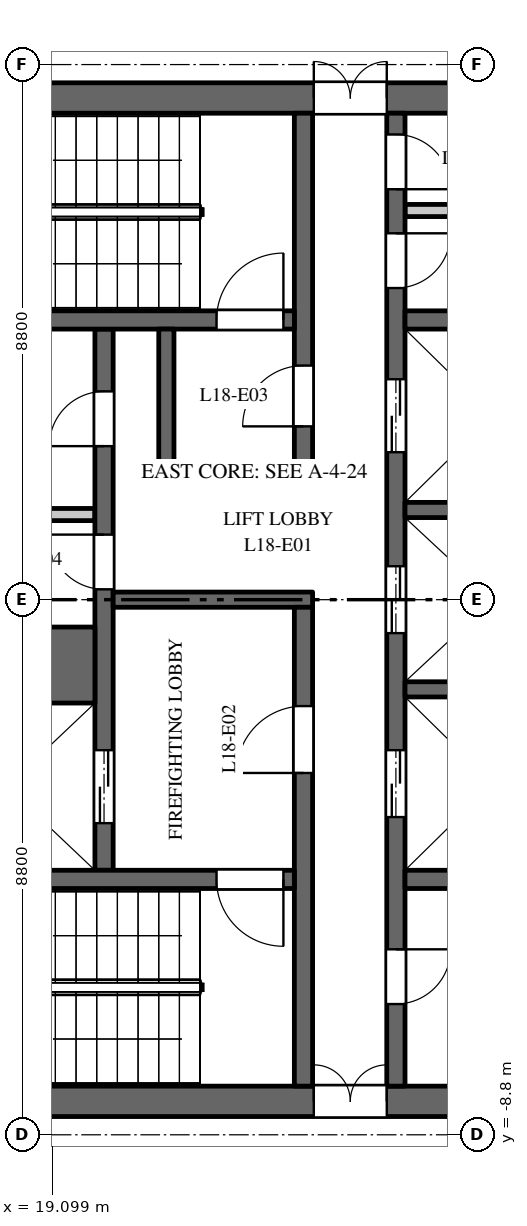
"""IFC4 building model, lengths in metres.
Left out: names, types, materials, properties, quantities, classifications, styles, units other than length and angle.
Written with IfcOpenShell. Run it as: python <this file> out.ifc"""

import sys

from ifc_helpers import new_model, si_unit, direction, frame, frame_2d, origin, place, context, subcontext, project, spatial, rectangle, extrude, element, fill, save


model = new_model("IFC4")
c1 = context("Model", 3, precision=1e-05, world=origin(), true_north=direction((0.0, 1.0)))
c2 = subcontext(c1, "Body", "Model", "MODEL_VIEW")
j1 = project(units=[si_unit("LENGTHUNIT", "METRE"), si_unit("PLANEANGLEUNIT", "RADIAN")], contexts=[c1])
p1 = place(None, origin())
s1 = spatial("IfcSite", under=j1, at=p1, CompositionType="ELEMENT")
p2 = place(p1, origin())
s2 = spatial("IfcBuilding", under=s1, at=p2, CompositionType="ELEMENT")
p3 = place(p2, frame((0.0, 0.0, 82.5)))
s3 = spatial("IfcBuildingStorey", under=s2, at=p3, CompositionType="ELEMENT", Elevation=82.5)
p4 = place(p3, frame((16.5, 8.25, 0.0), z_axis=(0.0, 0.0, 1.0), x_axis=(1.0, 0.0, 0.0)))
e1 = element("IfcWall", 1, at=p4, inside=s3, PredefinedType="SHEAR", context=c2, shape_type="SweptSolid", body=[
    extrude(rectangle(XDim=15.0, YDim=0.5, at=frame_2d((7.5, 0.0))), origin(), (0.0, 0.0, 1.0), 5.2),
])
p5 = place(p4, frame((6.9, 0.0, 0.0)))
e2 = element("IfcOpeningElement", 2, at=p5, cuts=e1, PredefinedType="OPENING", context=c2, shape_type="SweptSolid", body=[
    extrude(rectangle(XDim=1.2, YDim=2.1, at=frame_2d((0.6, 1.05))), frame((0.0, 0.26, 0.0), z_axis=(0.0, -1.0, 0.0), x_axis=(1.0, 0.0, 0.0)), (0.0, 0.0, 1.0), 0.52),
])
p6 = place(p4, frame((12.275, 0.0, 0.0)))
e3 = element("IfcOpeningElement", 3, at=p6, cuts=e1, PredefinedType="OPENING", context=c2, shape_type="SweptSolid", body=[
    extrude(rectangle(XDim=0.9, YDim=2.1, at=frame_2d((0.45, 1.05))), frame((0.0, 0.26, 0.0), z_axis=(0.0, -1.0, 0.0), x_axis=(1.0, 0.0, 0.0)), (0.0, 0.0, 1.0), 0.52),
])
p7 = place(p3, frame((16.5, -8.25, 0.0), z_axis=(0.0, 0.0, 1.0), x_axis=(1.0, 0.0, 0.0)))
e4 = element("IfcWall", 4, at=p7, inside=s3, PredefinedType="SHEAR", context=c2, shape_type="SweptSolid", body=[
    extrude(rectangle(XDim=15.0, YDim=0.5, at=frame_2d((7.5, 0.0))), origin(), (0.0, 0.0, 1.0), 5.2),
])
p8 = place(p7, frame((6.9, 0.0, 0.0)))
e5 = element("IfcOpeningElement", 5, at=p8, cuts=e4, PredefinedType="OPENING", context=c2, shape_type="SweptSolid", body=[
    extrude(rectangle(XDim=1.2, YDim=2.1, at=frame_2d((0.6, 1.05))), frame((0.0, 0.26, 0.0), z_axis=(0.0, -1.0, 0.0), x_axis=(1.0, 0.0, 0.0)), (0.0, 0.0, 1.0), 0.52),
])
p9 = place(p7, frame((12.95, 0.0, 0.0)))
e6 = element("IfcOpeningElement", 6, at=p9, cuts=e4, PredefinedType="OPENING", context=c2, shape_type="SweptSolid", body=[
    extrude(rectangle(XDim=0.9, YDim=2.1, at=frame_2d((0.45, 1.05))), frame((0.0, 0.26, 0.0), z_axis=(0.0, -1.0, 0.0), x_axis=(1.0, 0.0, 0.0)), (0.0, 0.0, 1.0), 0.52),
])
p10 = place(p3, frame((16.9, 1.4, 0.0), z_axis=(0.0, 0.0, 1.0), x_axis=(1.0, 0.0, 0.0)))
e7 = element("IfcWall", 7, at=p10, inside=s3, PredefinedType="PARTITIONING", context=c2, shape_type="SweptSolid", body=[
    extrude(rectangle(XDim=2.9, YDim=0.2, at=frame_2d((1.45, 0.0))), origin(), (0.0, 0.0, 1.0), 5.2),
])
p11 = place(p3, frame((19.95, -4.45, 0.0), z_axis=(0.0, 0.0, 1.0), x_axis=(0.0, 1.0, 0.0)))
e8 = element("IfcWall", 8, at=p11, inside=s3, PredefinedType="SHEAR", context=c2, shape_type="SweptSolid", body=[
    extrude(rectangle(XDim=8.9, YDim=0.3, at=frame_2d((4.45, 0.0))), origin(), (0.0, 0.0, 1.0), 5.2),
])
p12 = place(p11, frame((0.775, 0.0, 0.0)))
e9 = element("IfcOpeningElement", 9, at=p12, cuts=e8, PredefinedType="OPENING", context=c2, shape_type="SweptSolid", body=[
    extrude(rectangle(XDim=1.2, YDim=2.1, at=frame_2d((0.6, 1.05))), frame((0.0, 0.16, 0.0), z_axis=(0.0, -1.0, 0.0), x_axis=(1.0, 0.0, 0.0)), (0.0, 0.0, 1.0), 0.32),
])
p13 = place(p11, frame((4.62, 0.0, 0.0)))
e10 = element("IfcOpeningElement", 10, at=p13, cuts=e8, PredefinedType="OPENING", context=c2, shape_type="SweptSolid", body=[
    extrude(rectangle(XDim=0.9, YDim=2.1, at=frame_2d((0.45, 1.05))), frame((0.0, 0.16, 0.0), z_axis=(0.0, -1.0, 0.0), x_axis=(1.0, 0.0, 0.0)), (0.0, 0.0, 1.0), 0.32),
])
p14 = place(p11, frame((6.975, 0.0, 0.0)))
e11 = element("IfcOpeningElement", 11, at=p14, cuts=e8, PredefinedType="OPENING", context=c2, shape_type="SweptSolid", body=[
    extrude(rectangle(XDim=0.9, YDim=2.1, at=frame_2d((0.45, 1.05))), frame((0.0, 0.16, 0.0), z_axis=(0.0, -1.0, 0.0), x_axis=(1.0, 0.0, 0.0)), (0.0, 0.0, 1.0), 0.32),
])
p15 = place(p3, frame((24.75, -8.0, 0.0), z_axis=(0.0, 0.0, 1.0), x_axis=(0.0, 1.0, 0.0)))
e12 = element("IfcWall", 12, at=p15, inside=s3, PredefinedType="SHEAR", context=c2, shape_type="SweptSolid", body=[
    extrude(rectangle(XDim=16.0, YDim=0.3, at=frame_2d((8.0, 0.0))), origin(), (0.0, 0.0, 1.0), 5.2),
])
p16 = place(p15, frame((4.425, 0.0, 0.0)))
e13 = element("IfcOpeningElement", 13, at=p16, cuts=e12, PredefinedType="OPENING", context=c2, shape_type="SweptSolid", body=[
    extrude(rectangle(XDim=1.1, YDim=2.1, at=frame_2d((0.55, 1.05))), frame((0.0, 0.16, 0.0), z_axis=(0.0, -1.0, 0.0), x_axis=(1.0, 0.0, 0.0)), (0.0, 0.0, 1.0), 0.32),
])
p17 = place(p15, frame((7.45, 0.0, 0.0)))
e14 = element("IfcOpeningElement", 14, at=p17, cuts=e12, PredefinedType="OPENING", context=c2, shape_type="SweptSolid", body=[
    extrude(rectangle(XDim=1.1, YDim=2.1, at=frame_2d((0.55, 1.05))), frame((0.0, 0.16, 0.0), z_axis=(0.0, -1.0, 0.0), x_axis=(1.0, 0.0, 0.0)), (0.0, 0.0, 1.0), 0.32),
])
p18 = place(p15, frame((10.425, 0.0, 0.0)))
e15 = element("IfcOpeningElement", 15, at=p18, cuts=e12, PredefinedType="OPENING", context=c2, shape_type="SweptSolid", body=[
    extrude(rectangle(XDim=1.2, YDim=2.1, at=frame_2d((0.6, 1.05))), frame((0.0, 0.16, 0.0), z_axis=(0.0, -1.0, 0.0), x_axis=(1.0, 0.0, 0.0)), (0.0, 0.0, 1.0), 0.32),
])
p19 = place(p15, frame((13.125, 0.0, 0.0)))
e16 = element("IfcOpeningElement", 16, at=p19, cuts=e12, PredefinedType="OPENING", context=c2, shape_type="SweptSolid", body=[
    extrude(rectangle(XDim=0.9, YDim=2.1, at=frame_2d((0.45, 1.05))), frame((0.0, 0.16, 0.0), z_axis=(0.0, -1.0, 0.0), x_axis=(1.0, 0.0, 0.0)), (0.0, 0.0, 1.0), 0.32),
])
p20 = place(p15, frame((14.75, 0.0, 0.0)))
e17 = element("IfcOpeningElement", 17, at=p20, cuts=e12, PredefinedType="OPENING", context=c2, shape_type="SweptSolid", body=[
    extrude(rectangle(XDim=0.9, YDim=2.1, at=frame_2d((0.45, 1.05))), frame((0.0, 0.16, 0.0), z_axis=(0.0, -1.0, 0.0), x_axis=(1.0, 0.0, 0.0)), (0.0, 0.0, 1.0), 0.32),
])
p21 = place(p15, frame((1.35, 0.0, 0.0)))
e18 = element("IfcOpeningElement", 18, at=p21, cuts=e12, PredefinedType="OPENING", context=c2, shape_type="SweptSolid", body=[
    extrude(rectangle(XDim=0.9, YDim=2.1, at=frame_2d((0.45, 1.05))), frame((0.0, 0.16, 0.0), z_axis=(0.0, -1.0, 0.0), x_axis=(1.0, 0.0, 0.0)), (0.0, 0.0, 1.0), 0.32),
])
p22 = place(p3, frame((20.1, 0.0, 0.0), z_axis=(0.0, 0.0, 1.0), x_axis=(1.0, 0.0, 0.0)))
e19 = element("IfcWall", 19, at=p22, inside=s3, PredefinedType="SHEAR", context=c2, shape_type="SweptSolid", body=[
    extrude(rectangle(XDim=3.28, YDim=0.25, at=frame_2d((1.64, 0.0))), origin(), (0.0, 0.0, 1.0), 5.2),
])
p23 = place(p3, frame((24.9, 4.6, 0.0), z_axis=(0.0, 0.0, 1.0), x_axis=(1.0, 0.0, 0.0)))
e20 = element("IfcWall", 20, at=p23, inside=s3, PredefinedType="SHEAR", context=c2, shape_type="SweptSolid", body=[
    extrude(rectangle(XDim=6.1, YDim=0.3, at=frame_2d((3.05, 0.0))), origin(), (0.0, 0.0, 1.0), 5.2),
])
p24 = place(p23, frame((4.2, 0.0, 0.0)))
e21 = element("IfcOpeningElement", 21, at=p24, cuts=e20, PredefinedType="OPENING", context=c2, shape_type="SweptSolid", body=[
    extrude(rectangle(XDim=0.9, YDim=2.1, at=frame_2d((0.45, 1.05))), frame((0.0, 0.16, 0.0), z_axis=(0.0, -1.0, 0.0), x_axis=(1.0, 0.0, 0.0)), (0.0, 0.0, 1.0), 0.32),
])
p25 = place(p3, frame((24.9, 6.4, 0.0), z_axis=(0.0, 0.0, 1.0), x_axis=(1.0, 0.0, 0.0)))
e22 = element("IfcWall", 22, at=p25, inside=s3, PredefinedType="PARTITIONING", context=c2, shape_type="SweptSolid", body=[
    extrude(rectangle(XDim=2.35, YDim=0.2, at=frame_2d((1.175, 0.0))), origin(), (0.0, 0.0, 1.0), 5.2),
])
p26 = place(p3, frame((24.9, -4.6, 0.0), z_axis=(0.0, 0.0, 1.0), x_axis=(1.0, 0.0, 0.0)))
e23 = element("IfcWall", 23, at=p26, inside=s3, PredefinedType="SHEAR", context=c2, shape_type="SweptSolid", body=[
    extrude(rectangle(XDim=6.1, YDim=0.3, at=frame_2d((3.05, 0.0))), origin(), (0.0, 0.0, 1.0), 5.2),
])
p27 = place(p3, frame((16.9, -1.075, 0.0), z_axis=(0.0, 0.0, 1.0), x_axis=(1.0, 0.0, 0.0)))
e24 = element("IfcWall", 24, at=p27, inside=s3, PredefinedType="SHEAR", context=c2, shape_type="SweptSolid", body=[
    extrude(rectangle(XDim=2.9, YDim=1.25, at=frame_2d((1.45, 0.0))), origin(), (0.0, 0.0, 1.0), 5.2),
])
for number, where, z_axis, x_axis in (
    (25, (24.9, -1.475, 0.0), (0.0, 0.0, 1.0), (1.0, 0.0, 0.0)),
    (26, (24.9, 1.475, 0.0), (0.0, 0.0, 1.0), (1.0, 0.0, 0.0)),
):
    element("IfcWall", number, at=place(p3, frame(where, z_axis=z_axis, x_axis=x_axis)), inside=s3, PredefinedType="SHEAR", context=c2, shape_type="SweptSolid", body=[
        extrude(rectangle(XDim=2.9, YDim=0.25, at=frame_2d((1.45, 0.0))), origin(), (0.0, 0.0, 1.0), 5.2),
    ])
p28 = place(p3, frame((23.23, 2.25, 0.0), z_axis=(0.0, 0.0, 1.0), x_axis=(0.0, 1.0, 0.0)))
e27 = element("IfcWall", 27, at=p28, inside=s3, PredefinedType="SHEAR", context=c2, shape_type="SweptSolid", body=[
    extrude(rectangle(XDim=5.75, YDim=0.3, at=frame_2d((2.875, 0.0))), origin(), (0.0, 0.0, 1.0), 5.2),
])
p29 = place(p28, frame((0.6, 0.0, 0.0)))
e28 = element("IfcOpeningElement", 28, at=p29, cuts=e27, PredefinedType="OPENING", context=c2, shape_type="SweptSolid", body=[
    extrude(rectangle(XDim=1.0, YDim=2.1, at=frame_2d((0.5, 1.05))), frame((0.0, 0.16, 0.0), z_axis=(0.0, -1.0, 0.0), x_axis=(1.0, 0.0, 0.0)), (0.0, 0.0, 1.0), 0.32),
])
p30 = place(p3, frame((23.23, -8.0, 0.0), z_axis=(0.0, 0.0, 1.0), x_axis=(0.0, 1.0, 0.0)))
e29 = element("IfcWall", 29, at=p30, inside=s3, PredefinedType="SHEAR", context=c2, shape_type="SweptSolid", body=[
    extrude(rectangle(XDim=7.875, YDim=0.3, at=frame_2d((3.938, 0.0))), origin(), (0.0, 0.0, 1.0), 5.2),
])
p31 = place(p30, frame((5.15, 0.0, 0.0)))
e30 = element("IfcOpeningElement", 30, at=p31, cuts=e29, PredefinedType="OPENING", context=c2, shape_type="SweptSolid", body=[
    extrude(rectangle(XDim=1.1, YDim=2.1, at=frame_2d((0.55, 1.05))), frame((0.0, 0.16, 0.0), z_axis=(0.0, -1.0, 0.0), x_axis=(1.0, 0.0, 0.0)), (0.0, 0.0, 1.0), 0.32),
])
p32 = place(p3, frame((16.9, 4.6, 0.0), z_axis=(0.0, 0.0, 1.0), x_axis=(1.0, 0.0, 0.0)))
e31 = element("IfcWall", 31, at=p32, inside=s3, PredefinedType="SHEAR", context=c2, shape_type="SweptSolid", body=[
    extrude(rectangle(XDim=6.18, YDim=0.3, at=frame_2d((3.09, 0.0))), origin(), (0.0, 0.0, 1.0), 5.2),
])
p33 = place(p32, frame((4.9, 0.0, 0.0)))
e32 = element("IfcOpeningElement", 32, at=p33, cuts=e31, PredefinedType="OPENING", context=c2, shape_type="SweptSolid", body=[
    extrude(rectangle(XDim=1.1, YDim=2.1, at=frame_2d((0.55, 1.05))), frame((0.0, 0.16, 0.0), z_axis=(0.0, -1.0, 0.0), x_axis=(1.0, 0.0, 0.0)), (0.0, 0.0, 1.0), 0.32),
])
p34 = place(p3, frame((16.9, -4.6, 0.0), z_axis=(0.0, 0.0, 1.0), x_axis=(1.0, 0.0, 0.0)))
e33 = element("IfcWall", 33, at=p34, inside=s3, PredefinedType="SHEAR", context=c2, shape_type="SweptSolid", body=[
    extrude(rectangle(XDim=6.18, YDim=0.3, at=frame_2d((3.09, 0.0))), origin(), (0.0, 0.0, 1.0), 5.2),
])
p35 = place(p34, frame((4.9, 0.0, 0.0)))
e34 = element("IfcOpeningElement", 34, at=p35, cuts=e33, PredefinedType="OPENING", context=c2, shape_type="SweptSolid", body=[
    extrude(rectangle(XDim=1.1, YDim=2.1, at=frame_2d((0.55, 1.05))), frame((0.0, 0.16, 0.0), z_axis=(0.0, -1.0, 0.0), x_axis=(1.0, 0.0, 0.0)), (0.0, 0.0, 1.0), 0.32),
])
p36 = place(p3, frame((20.85, 2.125, 0.0), z_axis=(0.0, 0.0, 1.0), x_axis=(1.0, 0.0, 0.0)))
e35 = element("IfcWall", 35, at=p36, inside=s3, PredefinedType="SHEAR", context=c2, shape_type="SweptSolid", body=[
    extrude(rectangle(XDim=2.53, YDim=0.25, at=frame_2d((1.265, 0.0))), origin(), (0.0, 0.0, 1.0), 5.2),
])
p37 = place(p3, frame((20.975, 2.25, 0.0), z_axis=(0.0, 0.0, 1.0), x_axis=(0.0, 1.0, 0.0)))
e36 = element("IfcWall", 36, at=p37, inside=s3, PredefinedType="SHEAR", context=c2, shape_type="SweptSolid", body=[
    extrude(rectangle(XDim=2.2, YDim=0.25, at=frame_2d((1.1, 0.0))), origin(), (0.0, 0.0, 1.0), 5.2),
])
p38 = place(p12, origin())
e37 = element("IfcDoor", 37, at=p38, inside=s3, OperationType="DOUBLE_DOOR_SLIDING", PredefinedType="DOOR", context=c2, shape_type="SweptSolid", body=[
    extrude(rectangle(XDim=1.2, YDim=2.1, at=frame_2d((0.6, 1.05))), frame((0.0, 0.025, 0.0), z_axis=(0.0, -1.0, 0.0), x_axis=(1.0, 0.0, 0.0)), (0.0, 0.0, 1.0), 0.05),
])
fill(e9, e37)
p39 = place(p16, origin())
e38 = element("IfcDoor", 38, at=p39, inside=s3, OperationType="DOUBLE_DOOR_SLIDING", PredefinedType="DOOR", context=c2, shape_type="SweptSolid", body=[
    extrude(rectangle(XDim=1.1, YDim=2.1, at=frame_2d((0.55, 1.05))), frame((0.0, 0.025, 0.0), z_axis=(0.0, -1.0, 0.0), x_axis=(1.0, 0.0, 0.0)), (0.0, 0.0, 1.0), 0.05),
])
fill(e13, e38)
p40 = place(p17, origin())
e39 = element("IfcDoor", 39, at=p40, inside=s3, OperationType="DOUBLE_DOOR_SLIDING", PredefinedType="DOOR", context=c2, shape_type="SweptSolid", body=[
    extrude(rectangle(XDim=1.1, YDim=2.1, at=frame_2d((0.55, 1.05))), frame((0.0, 0.025, 0.0), z_axis=(0.0, -1.0, 0.0), x_axis=(1.0, 0.0, 0.0)), (0.0, 0.0, 1.0), 0.05),
])
fill(e14, e39)
p41 = place(p18, origin())
e40 = element("IfcDoor", 40, at=p41, inside=s3, OperationType="DOUBLE_DOOR_SLIDING", PredefinedType="DOOR", context=c2, shape_type="SweptSolid", body=[
    extrude(rectangle(XDim=1.2, YDim=2.1, at=frame_2d((0.6, 1.05))), frame((0.0, 0.025, 0.0), z_axis=(0.0, -1.0, 0.0), x_axis=(1.0, 0.0, 0.0)), (0.0, 0.0, 1.0), 0.05),
])
fill(e15, e40)
p42 = place(p33, origin())
e41 = element("IfcDoor", 41, at=p42, inside=s3, OperationType="SINGLE_SWING_LEFT", PredefinedType="DOOR", context=c2, shape_type="SweptSolid", body=[
    extrude(rectangle(XDim=1.1, YDim=2.1, at=frame_2d((0.55, 1.05))), frame((0.0, 0.025, 0.0), z_axis=(0.0, -1.0, 0.0), x_axis=(1.0, 0.0, 0.0)), (0.0, 0.0, 1.0), 0.05),
])
fill(e32, e41)
p43 = place(p35, origin())
e42 = element("IfcDoor", 42, at=p43, inside=s3, OperationType="SINGLE_SWING_RIGHT", PredefinedType="DOOR", context=c2, shape_type="SweptSolid", body=[
    extrude(rectangle(XDim=1.1, YDim=2.1, at=frame_2d((0.55, 1.05))), frame((0.0, 0.025, 0.0), z_axis=(0.0, -1.0, 0.0), x_axis=(1.0, 0.0, 0.0)), (0.0, 0.0, 1.0), 0.05),
])
fill(e34, e42)
p44 = place(p31, origin())
e43 = element("IfcDoor", 43, at=p44, inside=s3, OperationType="SINGLE_SWING_RIGHT", PredefinedType="DOOR", context=c2, shape_type="SweptSolid", body=[
    extrude(rectangle(XDim=1.1, YDim=2.1, at=frame_2d((0.55, 1.05))), frame((0.0, 0.025, 0.0), z_axis=(0.0, -1.0, 0.0), x_axis=(1.0, 0.0, 0.0)), (0.0, 0.0, 1.0), 0.05),
])
fill(e30, e43)
p45 = place(p29, origin())
e44 = element("IfcDoor", 44, at=p45, inside=s3, OperationType="SINGLE_SWING_RIGHT", PredefinedType="DOOR", context=c2, shape_type="SweptSolid", body=[
    extrude(rectangle(XDim=1.0, YDim=2.1, at=frame_2d((0.5, 1.05))), frame((0.0, 0.025, 0.0), z_axis=(0.0, -1.0, 0.0), x_axis=(1.0, 0.0, 0.0)), (0.0, 0.0, 1.0), 0.05),
])
fill(e28, e44)
p46 = place(p5, origin())
e45 = element("IfcDoor", 45, at=p46, inside=s3, OperationType="DOUBLE_DOOR_DOUBLE_SWING", PredefinedType="DOOR", context=c2, shape_type="SweptSolid", body=[
    extrude(rectangle(XDim=1.2, YDim=2.1, at=frame_2d((0.6, 1.05))), frame((0.0, 0.025, 0.0), z_axis=(0.0, -1.0, 0.0), x_axis=(1.0, 0.0, 0.0)), (0.0, 0.0, 1.0), 0.05),
])
fill(e2, e45)
p47 = place(p8, origin())
e46 = element("IfcDoor", 46, at=p47, inside=s3, OperationType="DOUBLE_DOOR_DOUBLE_SWING", PredefinedType="DOOR", context=c2, shape_type="SweptSolid", body=[
    extrude(rectangle(XDim=1.2, YDim=2.1, at=frame_2d((0.6, 1.05))), frame((0.0, 0.025, 0.0), z_axis=(0.0, -1.0, 0.0), x_axis=(1.0, 0.0, 0.0)), (0.0, 0.0, 1.0), 0.05),
])
fill(e5, e46)
p48 = place(p13, origin())
e47 = element("IfcDoor", 47, at=p48, inside=s3, OperationType="SINGLE_SWING_LEFT", PredefinedType="DOOR", context=c2, shape_type="SweptSolid", body=[
    extrude(rectangle(XDim=0.9, YDim=2.1, at=frame_2d((0.45, 1.05))), frame((0.0, 0.025, 0.0), z_axis=(0.0, -1.0, 0.0), x_axis=(1.0, 0.0, 0.0)), (0.0, 0.0, 1.0), 0.05),
])
fill(e10, e47)
p49 = place(p14, origin())
e48 = element("IfcDoor", 48, at=p49, inside=s3, OperationType="SINGLE_SWING_RIGHT", PredefinedType="DOOR", context=c2, shape_type="SweptSolid", body=[
    extrude(rectangle(XDim=0.9, YDim=2.1, at=frame_2d((0.45, 1.05))), frame((0.0, 0.025, 0.0), z_axis=(0.0, -1.0, 0.0), x_axis=(1.0, 0.0, 0.0)), (0.0, 0.0, 1.0), 0.05),
])
fill(e11, e48)
p50 = place(p19, origin())
e49 = element("IfcDoor", 49, at=p50, inside=s3, OperationType="SINGLE_SWING_RIGHT", PredefinedType="DOOR", context=c2, shape_type="SweptSolid", body=[
    extrude(rectangle(XDim=0.9, YDim=2.1, at=frame_2d((0.45, 1.05))), frame((0.0, 0.025, 0.0), z_axis=(0.0, -1.0, 0.0), x_axis=(1.0, 0.0, 0.0)), (0.0, 0.0, 1.0), 0.05),
])
fill(e16, e49)
p51 = place(p20, origin())
e50 = element("IfcDoor", 50, at=p51, inside=s3, OperationType="SINGLE_SWING_LEFT", PredefinedType="DOOR", context=c2, shape_type="SweptSolid", body=[
    extrude(rectangle(XDim=0.9, YDim=2.1, at=frame_2d((0.45, 1.05))), frame((0.0, 0.025, 0.0), z_axis=(0.0, -1.0, 0.0), x_axis=(1.0, 0.0, 0.0)), (0.0, 0.0, 1.0), 0.05),
])
fill(e17, e50)
p52 = place(p21, origin())
e51 = element("IfcDoor", 51, at=p52, inside=s3, OperationType="SINGLE_SWING_RIGHT", PredefinedType="DOOR", context=c2, shape_type="SweptSolid", body=[
    extrude(rectangle(XDim=0.9, YDim=2.1, at=frame_2d((0.45, 1.05))), frame((0.0, 0.025, 0.0), z_axis=(0.0, -1.0, 0.0), x_axis=(1.0, 0.0, 0.0)), (0.0, 0.0, 1.0), 0.05),
])
fill(e18, e51)
save(model, sys.argv[1])
